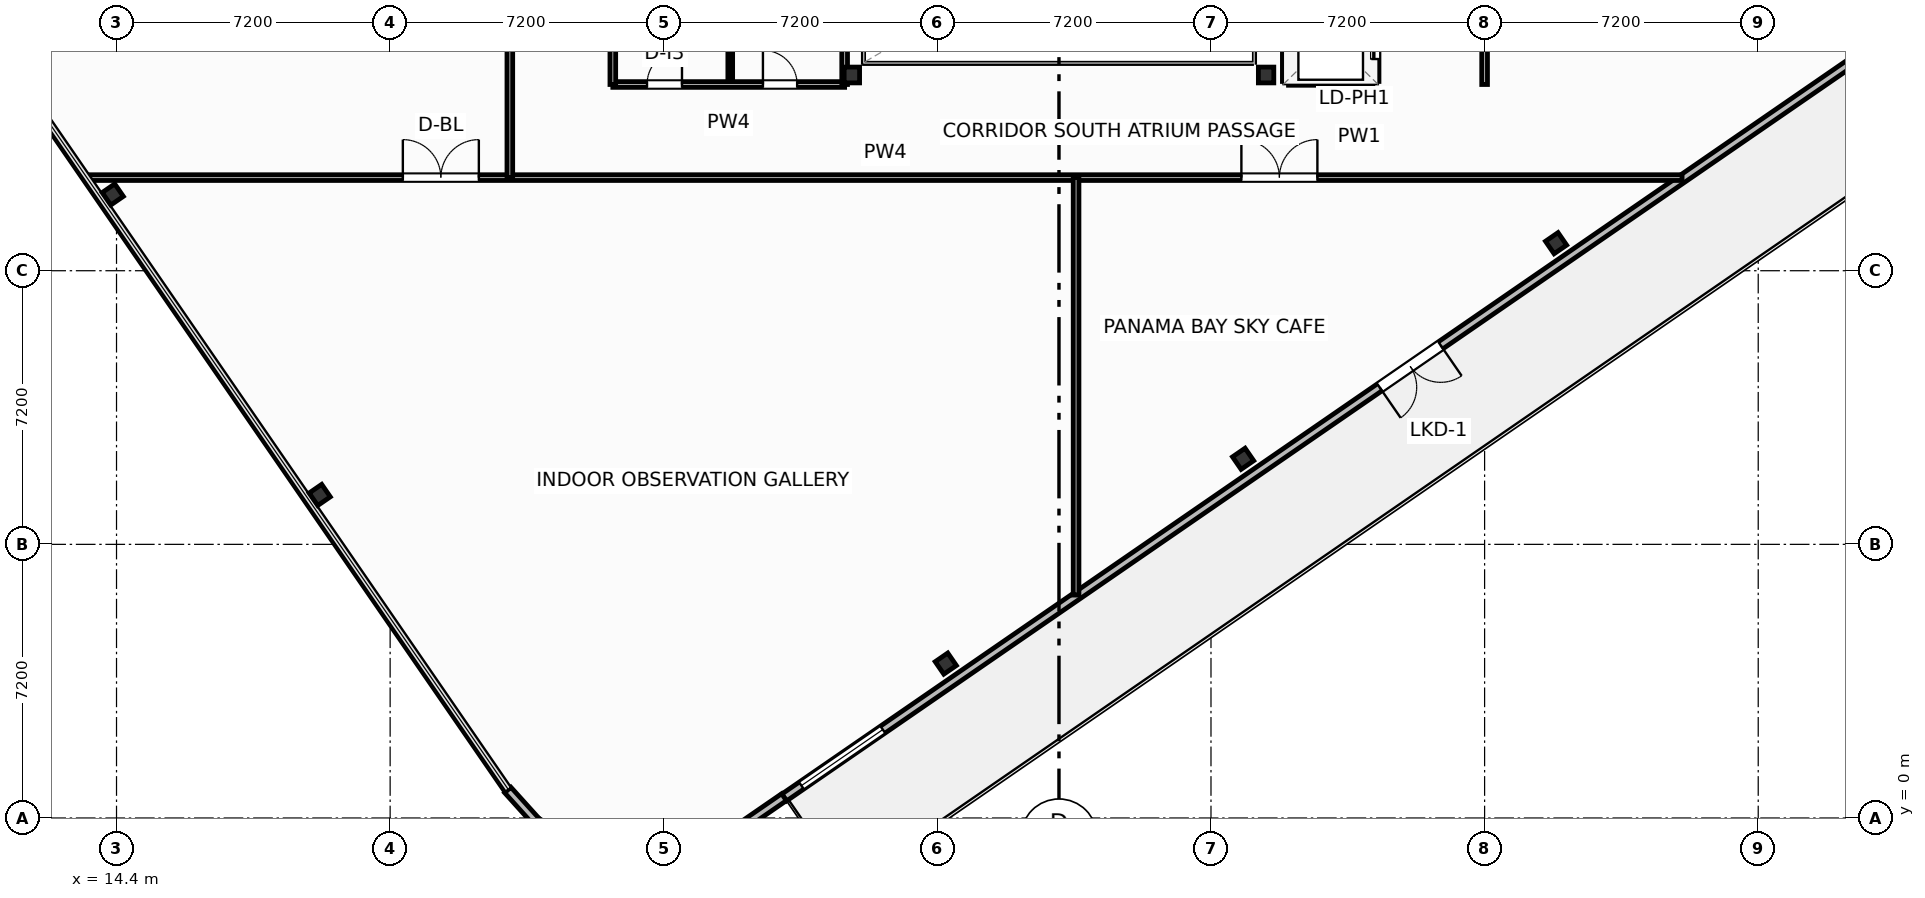
"""IFC4 building model, lengths in metres.
Left out: names, types, materials, properties, quantities, classifications, styles, units other than length and angle.
Written with IfcOpenShell. Run it as: python <this file> out.ifc"""

import sys

from ifc_helpers import new_model, si_unit, direction, frame, frame_2d, origin, origin_2d, place, context, subcontext, project, spatial, rectangle, i_section, extrude, element, fill, save


model = new_model("IFC4")
c1 = context("Model", 3, precision=1e-05, world=origin(), true_north=direction((0.0, 1.0)))
c2 = subcontext(c1, "Body", "Model", "MODEL_VIEW")
j1 = project(units=[si_unit("LENGTHUNIT", "METRE"), si_unit("PLANEANGLEUNIT", "RADIAN")], contexts=[c1])
p1 = place(None, origin())
s1 = spatial("IfcSite", under=j1, at=p1, CompositionType="ELEMENT")
p2 = place(p1, origin())
s2 = spatial("IfcBuilding", under=s1, at=p2, CompositionType="ELEMENT")
p3 = place(p2, frame((0.0, 0.0, 296.3)))
s3 = spatial("IfcBuildingStorey", under=s2, at=p3, CompositionType="ELEMENT", Elevation=296.3)
for number, where, z_axis, x_axis in (
    (1, (33.75, 19.55, 0.0), (0.0, 0.0, 1.0), (1.0, 0.0, 0.0)),
    (2, (44.65, 19.55, 0.0), (0.0, 0.0, 1.0), (1.0, 0.0, 0.0)),
):
    element("IfcColumn", number, at=place(p3, frame(where, z_axis=z_axis, x_axis=x_axis)), inside=s3, PredefinedType="COLUMN", context=c2, shape_type="SweptSolid", body=[
        extrude(i_section(OverallWidth=0.406, OverallDepth=0.416, WebThickness=0.03, FlangeThickness=0.048, FilletRadius=0.025, at=origin_2d()), origin(), (0.0, 0.0, 1.0), 4.8),
    ])
for number, where, z_axis, x_axis in (
    (3, (36.222, 4.063, -0.32), (0.0, 0.0, 1.0), (0.824, 0.567, 0.0)),
    (4, (44.045, 9.452, -0.32), (0.0, 0.0, 1.0), (0.824, 0.567, 0.0)),
    (5, (52.281, 15.125, -0.32), (0.0, 0.0, 1.0), (0.824, 0.567, 0.0)),
    (6, (14.301, 16.406, -0.32), (0.0, 0.0, 1.0), (0.824, 0.567, 0.0)),
    (7, (19.747, 8.5, -0.32), (0.0, 0.0, 1.0), (0.824, 0.567, 0.0)),
):
    element("IfcColumn", number, at=place(p3, frame(where, z_axis=z_axis, x_axis=x_axis)), inside=s3, PredefinedType="COLUMN", context=c2, shape_type="SweptSolid", body=[
        extrude(i_section(OverallWidth=0.401, OverallDepth=0.399, WebThickness=0.025, FlangeThickness=0.04, FilletRadius=0.022, at=origin_2d()), origin(), (0.0, 0.0, 1.0), 5.12),
    ])
p4 = place(p3, frame((64.912, 23.23, 0.0), z_axis=(0.0, 0.0, 1.0), x_axis=(-0.823534403617, -0.567266327275, 0.0)))
e8 = element("IfcWall", 8, at=p4, inside=s3, PredefinedType="SOLIDWALL", context=c2, shape_type="SweptSolid", body=[
    extrude(rectangle(XDim=40.0, YDim=0.22, at=frame_2d((20.0, 0.0))), origin(), (0.0, 0.0, 1.0), 3.83),
])
p5 = place(p4, frame((19.025, 0.0, 0.0)))
e9 = element("IfcOpeningElement", 9, at=p5, cuts=e8, PredefinedType="OPENING", context=c2, shape_type="SweptSolid", body=[
    extrude(rectangle(XDim=1.95, YDim=2.35, at=frame_2d((0.975, 1.175))), frame((0.0, 0.12, 0.0), z_axis=(0.0, -1.0, 0.0), x_axis=(1.0, 0.0, 0.0)), (0.0, 0.0, 1.0), 0.24),
])
p6 = place(p4, frame((0.55, 0.0, 0.75)))
e10 = element("IfcOpeningElement", 10, at=p6, cuts=e8, PredefinedType="OPENING", context=c2, shape_type="SweptSolid", body=[
    extrude(rectangle(XDim=2.6, YDim=2.0, at=frame_2d((1.3, 1.0))), frame((0.0, 0.12, 0.0), z_axis=(0.0, -1.0, 0.0), x_axis=(1.0, 0.0, 0.0)), (0.0, 0.0, 1.0), 0.24),
])
p7 = place(p4, frame((36.85, 0.0, 0.75)))
e11 = element("IfcOpeningElement", 11, at=p7, cuts=e8, PredefinedType="OPENING", context=c2, shape_type="SweptSolid", body=[
    extrude(rectangle(XDim=2.6, YDim=2.0, at=frame_2d((1.3, 1.0))), frame((0.0, 0.12, 0.0), z_axis=(0.0, -1.0, 0.0), x_axis=(1.0, 0.0, 0.0)), (0.0, 0.0, 1.0), 0.24),
])
p8 = place(p3, frame((24.695, 0.737, 0.0), z_axis=(0.0, 0.0, 1.0), x_axis=(0.66989400442, -0.742456748129, 0.0)))
e12 = element("IfcWall", 12, at=p8, inside=s3, PredefinedType="SOLIDWALL", context=c2, shape_type="SweptSolid", body=[
    extrude(rectangle(XDim=1.117, YDim=0.22, at=frame_2d((0.559, 0.0))), origin(), (0.0, 0.0, 1.0), 3.83),
])
p9 = place(p3, frame((30.674, -0.341, 0.0), z_axis=(0.0, 0.0, 1.0), x_axis=(0.823591688454, 0.567183154466, 0.0)))
e13 = element("IfcWall", 13, at=p9, inside=s3, PredefinedType="SOLIDWALL", context=c2, shape_type="SweptSolid", body=[
    extrude(rectangle(XDim=1.567, YDim=0.22, at=frame_2d((0.784, 0.0))), origin(), (0.0, 0.0, 1.0), 3.83),
])
p10 = place(p3, frame((27.46, 19.3, 0.0), z_axis=(0.0, 0.0, 1.0), x_axis=(1.0, 0.0, 0.0)))
e14 = element("IfcWall", 14, at=p10, inside=s3, PredefinedType="PARTITIONING", context=c2, shape_type="SweptSolid", body=[
    extrude(rectangle(XDim=6.1, YDim=0.15, at=frame_2d((3.05, 0.0))), origin(), (0.0, 0.0, 1.0), 3.839),
])
p11 = place(p10, frame((0.9, 0.0, 0.0)))
e15 = element("IfcOpeningElement", 15, at=p11, cuts=e14, PredefinedType="OPENING", context=c2, shape_type="SweptSolid", body=[
    extrude(rectangle(XDim=0.92, YDim=2.05, at=frame_2d((0.46, 1.025))), frame((0.0, 0.085, 0.0), z_axis=(0.0, -1.0, 0.0), x_axis=(1.0, 0.0, 0.0)), (0.0, 0.0, 1.0), 0.17),
])
p12 = place(p10, frame((3.95, 0.0, 0.0)))
e16 = element("IfcOpeningElement", 16, at=p12, cuts=e14, PredefinedType="OPENING", context=c2, shape_type="SweptSolid", body=[
    extrude(rectangle(XDim=0.9, YDim=2.05, at=frame_2d((0.45, 1.025))), frame((0.0, 0.085, 0.0), z_axis=(0.0, -1.0, 0.0), x_axis=(1.0, 0.0, 0.0)), (0.0, 0.0, 1.0), 0.17),
])
p13 = place(p3, frame((30.55, 19.38, 0.0), z_axis=(0.0, 0.0, 1.0), x_axis=(0.0, 1.0, 0.0)))
e17 = element("IfcWall", 17, at=p13, inside=s3, PredefinedType="PARTITIONING", context=c2, shape_type="SweptSolid", body=[
    extrude(rectangle(XDim=7.18, YDim=0.125, at=frame_2d((3.59, 0.0))), origin(), (0.0, 0.0, 1.0), 4.55),
])
p14 = place(p3, frame((27.46, 19.3, 0.0), z_axis=(0.0, 0.0, 1.0), x_axis=(0.0, 1.0, 0.0)))
e18 = element("IfcWall", 18, at=p14, inside=s3, PredefinedType="PARTITIONING", context=c2, shape_type="SweptSolid", body=[
    extrude(rectangle(XDim=7.34, YDim=0.15, at=frame_2d((3.67, 0.0))), origin(), (0.0, 0.0, 1.0), 4.55),
])
p15 = place(p3, frame((33.56, 19.3, 0.0), z_axis=(0.0, 0.0, 1.0), x_axis=(0.0, 1.0, 0.0)))
e19 = element("IfcWall", 19, at=p15, inside=s3, PredefinedType="PARTITIONING", context=c2, shape_type="SweptSolid", body=[
    extrude(rectangle(XDim=7.34, YDim=0.15, at=frame_2d((3.67, 0.0))), origin(), (0.0, 0.0, 1.0), 3.924),
])
p16 = place(p3, frame((13.659, 16.85, 0.0), z_axis=(0.0, 0.0, 1.0), x_axis=(1.0, 0.0, 0.0)))
e20 = element("IfcWall", 20, at=p16, inside=s3, PredefinedType="PARTITIONING", context=c2, shape_type="SweptSolid", body=[
    extrude(rectangle(XDim=41.937, YDim=0.15, at=frame_2d((20.969, 0.0))), origin(), (0.0, 0.0, 1.0), 3.839),
])
p17 = place(p16, frame((8.275, 0.0, 0.0)))
e21 = element("IfcOpeningElement", 21, at=p17, cuts=e20, PredefinedType="OPENING", context=c2, shape_type="SweptSolid", body=[
    extrude(rectangle(XDim=2.0, YDim=2.05, at=frame_2d((1.0, 1.025))), frame((0.0, 0.085, 0.0), z_axis=(0.0, -1.0, 0.0), x_axis=(1.0, 0.0, 0.0)), (0.0, 0.0, 1.0), 0.17),
])
p18 = place(p16, frame((30.341, 0.0, 0.0)))
e22 = element("IfcOpeningElement", 22, at=p18, cuts=e20, PredefinedType="OPENING", context=c2, shape_type="SweptSolid", body=[
    extrude(rectangle(XDim=2.0, YDim=2.05, at=frame_2d((1.0, 1.025))), frame((0.0, 0.085, 0.0), z_axis=(0.0, -1.0, 0.0), x_axis=(1.0, 0.0, 0.0)), (0.0, 0.0, 1.0), 0.17),
])
p19 = place(p3, frame((39.65, 5.866, 0.0), z_axis=(0.0, 0.0, 1.0), x_axis=(0.0, 1.0, 0.0)))
e23 = element("IfcWall", 23, at=p19, inside=s3, PredefinedType="PARTITIONING", context=c2, shape_type="SweptSolid", body=[
    extrude(rectangle(XDim=10.984, YDim=0.15, at=frame_2d((5.492, 0.0))), origin(), (0.0, 0.0, 1.0), 4.55),
])
p20 = place(p3, frame((24.75, 16.85, 0.0), z_axis=(0.0, 0.0, 1.0), x_axis=(0.0, 1.0, 0.0)))
e24 = element("IfcWall", 24, at=p20, inside=s3, PredefinedType="PARTITIONING", context=c2, shape_type="SweptSolid", body=[
    extrude(rectangle(XDim=18.241, YDim=0.15, at=frame_2d((9.12, 0.0))), origin(), (0.0, 0.0, 1.0), 4.55),
])
p21 = place(p20, frame((5.2, 0.0, 0.0)))
e25 = element("IfcOpeningElement", 25, at=p21, cuts=e24, PredefinedType="OPENING", context=c2, shape_type="SweptSolid", body=[
    extrude(rectangle(XDim=1.0, YDim=2.05, at=frame_2d((0.5, 1.025))), frame((0.0, 0.085, 0.0), z_axis=(0.0, -1.0, 0.0), x_axis=(1.0, 0.0, 0.0)), (0.0, 0.0, 1.0), 0.17),
])
p22 = place(p3, frame((50.4, 19.3, 0.0), z_axis=(0.0, 0.0, 1.0), x_axis=(0.0, 1.0, 0.0)))
e26 = element("IfcWall", 26, at=p22, inside=s3, PredefinedType="PARTITIONING", context=c2, shape_type="SweptSolid", body=[
    extrude(rectangle(XDim=7.38, YDim=0.15, at=frame_2d((3.69, 0.0))), origin(), (0.0, 0.0, 1.0), 4.55),
])
p23 = place(p3, frame((45.24, 19.38, 0.0), z_axis=(0.0, 0.0, 1.0), x_axis=(1.0, 0.0, 0.0)))
e27 = element("IfcWall", 27, at=p23, inside=s3, PredefinedType="PARTITIONING", context=c2, shape_type="SweptSolid", body=[
    extrude(rectangle(XDim=2.22, YDim=0.2, at=frame_2d((1.11, 0.0))), origin(), (0.0, 0.0, 1.0), 4.55),
])
p24 = place(p3, frame((45.18, 19.38, 0.0), z_axis=(0.0, 0.0, 1.0), x_axis=(0.0, 1.0, 0.0)))
e28 = element("IfcWall", 28, at=p24, inside=s3, PredefinedType="PARTITIONING", context=c2, shape_type="SweptSolid", body=[
    extrude(rectangle(XDim=6.9, YDim=0.2, at=frame_2d((3.45, 0.0))), origin(), (0.0, 0.0, 1.0), 4.55),
])
p25 = place(p3, frame((47.52, 19.38, 0.0), z_axis=(0.0, 0.0, 1.0), x_axis=(0.0, 1.0, 0.0)))
e29 = element("IfcWall", 29, at=p25, inside=s3, PredefinedType="PARTITIONING", context=c2, shape_type="SweptSolid", body=[
    extrude(rectangle(XDim=6.9, YDim=0.2, at=frame_2d((3.45, 0.0))), origin(), (0.0, 0.0, 1.0), 4.55),
])
p26 = place(p25, frame((0.59, 0.0, 0.0)))
e30 = element("IfcOpeningElement", 30, at=p26, cuts=e29, PredefinedType="OPENING", context=c2, shape_type="SweptSolid", body=[
    extrude(rectangle(XDim=1.1, YDim=2.15, at=frame_2d((0.55, 1.075))), frame((0.0, 0.11, 0.0), z_axis=(0.0, -1.0, 0.0), x_axis=(1.0, 0.0, 0.0)), (0.0, 0.0, 1.0), 0.22),
])
p27 = place(p25, frame((2.89, 0.0, 0.0)))
e31 = element("IfcOpeningElement", 31, at=p27, cuts=e29, PredefinedType="OPENING", context=c2, shape_type="SweptSolid", body=[
    extrude(rectangle(XDim=1.1, YDim=2.15, at=frame_2d((0.55, 1.075))), frame((0.0, 0.11, 0.0), z_axis=(0.0, -1.0, 0.0), x_axis=(1.0, 0.0, 0.0)), (0.0, 0.0, 1.0), 0.22),
])
p28 = place(p25, frame((5.19, 0.0, 0.0)))
e32 = element("IfcOpeningElement", 32, at=p28, cuts=e29, PredefinedType="OPENING", context=c2, shape_type="SweptSolid", body=[
    extrude(rectangle(XDim=1.1, YDim=2.15, at=frame_2d((0.55, 1.075))), frame((0.0, 0.11, 0.0), z_axis=(0.0, -1.0, 0.0), x_axis=(1.0, 0.0, 0.0)), (0.0, 0.0, 1.0), 0.22),
])
p29 = place(p5, origin())
e33 = element("IfcDoor", 33, at=p29, inside=s3, OperationType="DOUBLE_DOOR_SINGLE_SWING", PredefinedType="DOOR", context=c2, shape_type="SweptSolid", body=[
    extrude(rectangle(XDim=1.95, YDim=2.35, at=frame_2d((0.975, 1.175))), frame((0.0, 0.025, 0.0), z_axis=(0.0, -1.0, 0.0), x_axis=(1.0, 0.0, 0.0)), (0.0, 0.0, 1.0), 0.05),
])
fill(e9, e33)
p30 = place(p7, origin())
e34 = element("IfcWindow", 34, at=p30, inside=s3, PartitioningType="SINGLE_PANEL", PredefinedType="WINDOW", context=c2, shape_type="SweptSolid", body=[
    extrude(rectangle(XDim=2.6, YDim=2.0, at=frame_2d((1.3, 1.0))), frame((0.0, 0.03, 0.0), z_axis=(0.0, -1.0, 0.0), x_axis=(1.0, 0.0, 0.0)), (0.0, 0.0, 1.0), 0.06),
])
fill(e11, e34)
p31 = place(p11, origin())
e35 = element("IfcDoor", 35, at=p31, inside=s3, OperationType="SINGLE_SWING_RIGHT", PredefinedType="DOOR", context=c2, shape_type="SweptSolid", body=[
    extrude(rectangle(XDim=0.92, YDim=2.05, at=frame_2d((0.46, 1.025))), frame((0.0, 0.025, 0.0), z_axis=(0.0, -1.0, 0.0), x_axis=(1.0, 0.0, 0.0)), (0.0, 0.0, 1.0), 0.05),
])
fill(e15, e35)
p32 = place(p12, origin())
e36 = element("IfcDoor", 36, at=p32, inside=s3, OperationType="SINGLE_SWING_LEFT", PredefinedType="DOOR", context=c2, shape_type="SweptSolid", body=[
    extrude(rectangle(XDim=0.9, YDim=2.05, at=frame_2d((0.45, 1.025))), frame((0.0, 0.025, 0.0), z_axis=(0.0, -1.0, 0.0), x_axis=(1.0, 0.0, 0.0)), (0.0, 0.0, 1.0), 0.05),
])
fill(e16, e36)
p33 = place(p17, origin())
e37 = element("IfcDoor", 37, at=p33, inside=s3, OperationType="DOUBLE_DOOR_SINGLE_SWING", PredefinedType="DOOR", context=c2, shape_type="SweptSolid", body=[
    extrude(rectangle(XDim=2.0, YDim=2.05, at=frame_2d((1.0, 1.025))), frame((0.0, 0.025, 0.0), z_axis=(0.0, -1.0, 0.0), x_axis=(1.0, 0.0, 0.0)), (0.0, 0.0, 1.0), 0.05),
])
fill(e21, e37)
p34 = place(p18, origin())
e38 = element("IfcDoor", 38, at=p34, inside=s3, OperationType="DOUBLE_DOOR_SINGLE_SWING", PredefinedType="DOOR", context=c2, shape_type="SweptSolid", body=[
    extrude(rectangle(XDim=2.0, YDim=2.05, at=frame_2d((1.0, 1.025))), frame((0.0, 0.025, 0.0), z_axis=(0.0, -1.0, 0.0), x_axis=(1.0, 0.0, 0.0)), (0.0, 0.0, 1.0), 0.05),
])
fill(e22, e38)
p35 = place(p26, origin())
e39 = element("IfcDoor", 39, at=p35, inside=s3, OperationType="SLIDING_TO_LEFT", PredefinedType="DOOR", context=c2, shape_type="SweptSolid", body=[
    extrude(rectangle(XDim=1.1, YDim=2.15, at=frame_2d((0.55, 1.075))), frame((0.0, 0.025, 0.0), z_axis=(0.0, -1.0, 0.0), x_axis=(1.0, 0.0, 0.0)), (0.0, 0.0, 1.0), 0.05),
])
fill(e30, e39)
save(model, sys.argv[1])
